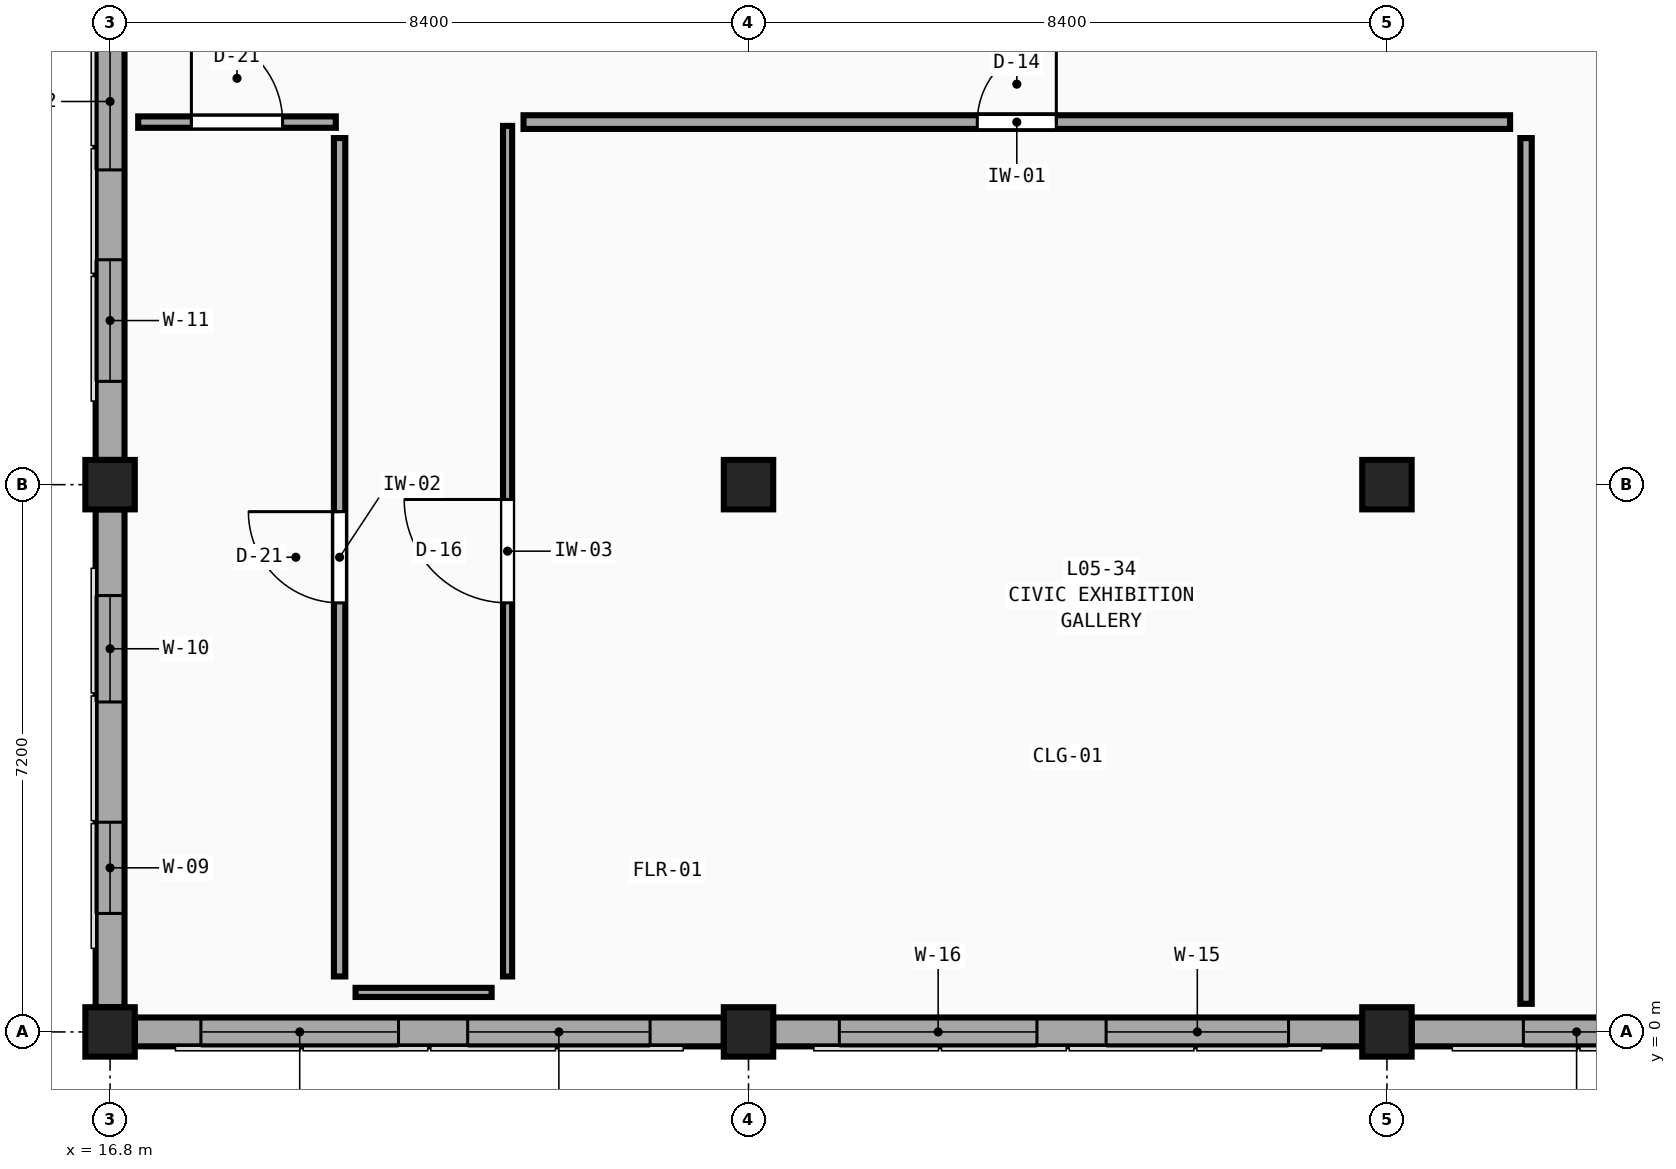
"""IFC4 building model, lengths in metres.
Left out: names, types, materials, properties, quantities, classifications, styles, units other than length and angle.
Written with IfcOpenShell. Run it as: python <this file> out.ifc"""

import sys

from ifc_helpers import new_model, si_unit, direction, frame, frame_2d, origin, origin_2d, place, context, subcontext, project, spatial, rectangle, extrude, element, fill, save


model = new_model("IFC4")
c1 = context("Model", 3, precision=1e-05, world=origin(), true_north=direction((0.0, 1.0)))
c2 = subcontext(c1, "Body", "Model", "MODEL_VIEW")
j1 = project(units=[si_unit("LENGTHUNIT", "METRE"), si_unit("PLANEANGLEUNIT", "RADIAN")], contexts=[c1])
p1 = place(None, origin())
s1 = spatial("IfcSite", under=j1, at=p1, CompositionType="ELEMENT")
p2 = place(p1, origin())
s2 = spatial("IfcBuilding", under=s1, at=p2, CompositionType="ELEMENT")
p3 = place(p2, frame((0.0, 0.0, 23.4)))
s3 = spatial("IfcBuildingStorey", under=s2, at=p3, CompositionType="ELEMENT", Elevation=23.4)
for number, where, z_axis, x_axis in (
    (1, (16.8, 0.0, 0.0), (0.0, 0.0, 1.0), (1.0, 0.0, 0.0)),
    (2, (16.8, 7.2, 0.0), (0.0, 0.0, 1.0), (1.0, 0.0, 0.0)),
    (3, (25.2, 0.0, 0.0), (0.0, 0.0, 1.0), (1.0, 0.0, 0.0)),
    (4, (25.2, 7.2, 0.0), (0.0, 0.0, 1.0), (1.0, 0.0, 0.0)),
    (5, (33.6, 0.0, 0.0), (0.0, 0.0, 1.0), (1.0, 0.0, 0.0)),
    (6, (33.6, 7.2, 0.0), (0.0, 0.0, 1.0), (1.0, 0.0, 0.0)),
):
    element("IfcColumn", number, at=place(p3, frame(where, z_axis=z_axis, x_axis=x_axis)), inside=s3, PredefinedType="COLUMN", context=c2, shape_type="SweptSolid", body=[
        extrude(rectangle(XDim=0.65, YDim=0.65, at=origin_2d()), origin(), (0.0, 0.0, 1.0), 4.5),
    ])
p4 = place(p3, frame((24.875, 0.0, 0.0), z_axis=(0.0, 0.0, 1.0), x_axis=(-1.0, 0.0, 0.0)))
e7 = element("IfcWall", 7, at=p4, inside=s3, PredefinedType="SOLIDWALL", context=c2, shape_type="SweptSolid", body=[
    extrude(rectangle(XDim=7.75, YDim=0.38, at=frame_2d((3.875, 0.0))), origin(), (0.0, 0.0, 1.0), 3.66),
])
p5 = place(p4, frame((0.97, 0.0, 0.75)))
e8 = element("IfcOpeningElement", 8, at=p5, cuts=e7, PredefinedType="OPENING", context=c2, shape_type="SweptSolid", body=[
    extrude(rectangle(XDim=2.4, YDim=1.9, at=frame_2d((1.2, 0.95))), frame((0.0, 0.21, 0.0), z_axis=(0.0, -1.0, 0.0), x_axis=(1.0, 0.0, 0.0)), (0.0, 0.0, 1.0), 0.42),
])
p6 = place(p4, frame((4.28, 0.0, 0.75)))
e9 = element("IfcOpeningElement", 9, at=p6, cuts=e7, PredefinedType="OPENING", context=c2, shape_type="SweptSolid", body=[
    extrude(rectangle(XDim=2.6, YDim=1.9, at=frame_2d((1.3, 0.95))), frame((0.0, 0.21, 0.0), z_axis=(0.0, -1.0, 0.0), x_axis=(1.0, 0.0, 0.0)), (0.0, 0.0, 1.0), 0.42),
])
p7 = place(p3, frame((16.8, 0.325, 0.0), z_axis=(0.0, 0.0, 1.0), x_axis=(0.0, 1.0, 0.0)))
e10 = element("IfcWall", 10, at=p7, inside=s3, PredefinedType="SOLIDWALL", context=c2, shape_type="SweptSolid", body=[
    extrude(rectangle(XDim=6.55, YDim=0.38, at=frame_2d((3.275, 0.0))), origin(), (0.0, 0.0, 1.0), 3.66),
])
p8 = place(p7, frame((1.234, 0.0, 0.75)))
e11 = element("IfcOpeningElement", 11, at=p8, cuts=e10, PredefinedType="OPENING", context=c2, shape_type="SweptSolid", body=[
    extrude(rectangle(XDim=1.2, YDim=2.08, at=frame_2d((0.6, 1.04))), frame((0.0, 0.21, 0.0), z_axis=(0.0, -1.0, 0.0), x_axis=(1.0, 0.0, 0.0)), (0.0, 0.0, 1.0), 0.42),
])
p9 = place(p7, frame((4.016, 0.0, 0.75)))
e12 = element("IfcOpeningElement", 12, at=p9, cuts=e10, PredefinedType="OPENING", context=c2, shape_type="SweptSolid", body=[
    extrude(rectangle(XDim=1.4, YDim=2.08, at=frame_2d((0.7, 1.04))), frame((0.0, 0.21, 0.0), z_axis=(0.0, -1.0, 0.0), x_axis=(1.0, 0.0, 0.0)), (0.0, 0.0, 1.0), 0.42),
])
p10 = place(p3, frame((16.8, 7.525, 0.0), z_axis=(0.0, 0.0, 1.0), x_axis=(0.0, 1.0, 0.0)))
e13 = element("IfcWall", 13, at=p10, inside=s3, PredefinedType="SOLIDWALL", context=c2, shape_type="SweptSolid", body=[
    extrude(rectangle(XDim=6.55, YDim=0.38, at=frame_2d((3.275, 0.0))), origin(), (0.0, 0.0, 1.0), 3.66),
])
p11 = place(p10, frame((1.034, 0.0, 0.75)))
e14 = element("IfcOpeningElement", 14, at=p11, cuts=e13, PredefinedType="OPENING", context=c2, shape_type="SweptSolid", body=[
    extrude(rectangle(XDim=1.6, YDim=2.08, at=frame_2d((0.8, 1.04))), frame((0.0, 0.21, 0.0), z_axis=(0.0, -1.0, 0.0), x_axis=(1.0, 0.0, 0.0)), (0.0, 0.0, 1.0), 0.42),
])
p12 = place(p10, frame((3.816, 0.0, 0.75)))
e15 = element("IfcOpeningElement", 15, at=p12, cuts=e13, PredefinedType="OPENING", context=c2, shape_type="SweptSolid", body=[
    extrude(rectangle(XDim=1.8, YDim=2.08, at=frame_2d((0.9, 1.04))), frame((0.0, 0.21, 0.0), z_axis=(0.0, -1.0, 0.0), x_axis=(1.0, 0.0, 0.0)), (0.0, 0.0, 1.0), 0.42),
])
p13 = place(p3, frame((33.275, 0.0, 0.0), z_axis=(0.0, 0.0, 1.0), x_axis=(-1.0, 0.0, 0.0)))
e16 = element("IfcWall", 16, at=p13, inside=s3, PredefinedType="SOLIDWALL", context=c2, shape_type="SweptSolid", body=[
    extrude(rectangle(XDim=7.75, YDim=0.38, at=frame_2d((3.875, 0.0))), origin(), (0.0, 0.0, 1.0), 3.66),
])
p14 = place(p13, frame((0.97, 0.0, 0.75)))
e17 = element("IfcOpeningElement", 17, at=p14, cuts=e16, PredefinedType="OPENING", context=c2, shape_type="SweptSolid", body=[
    extrude(rectangle(XDim=2.4, YDim=2.08, at=frame_2d((1.2, 1.04))), frame((0.0, 0.21, 0.0), z_axis=(0.0, -1.0, 0.0), x_axis=(1.0, 0.0, 0.0)), (0.0, 0.0, 1.0), 0.42),
])
p15 = place(p13, frame((4.28, 0.0, 0.75)))
e18 = element("IfcOpeningElement", 18, at=p15, cuts=e16, PredefinedType="OPENING", context=c2, shape_type="SweptSolid", body=[
    extrude(rectangle(XDim=2.6, YDim=2.08, at=frame_2d((1.3, 1.04))), frame((0.0, 0.21, 0.0), z_axis=(0.0, -1.0, 0.0), x_axis=(1.0, 0.0, 0.0)), (0.0, 0.0, 1.0), 0.42),
])
p16 = place(p3, frame((41.675, 0.0, 0.0), z_axis=(0.0, 0.0, 1.0), x_axis=(-1.0, 0.0, 0.0)))
e19 = element("IfcWall", 19, at=p16, inside=s3, PredefinedType="SOLIDWALL", context=c2, shape_type="SweptSolid", body=[
    extrude(rectangle(XDim=7.75, YDim=0.38, at=frame_2d((3.875, 0.0))), origin(), (0.0, 0.0, 1.0), 3.66),
])
p17 = place(p16, frame((1.57, 0.0, 0.75)))
e20 = element("IfcOpeningElement", 20, at=p17, cuts=e19, PredefinedType="OPENING", context=c2, shape_type="SweptSolid", body=[
    extrude(rectangle(XDim=1.2, YDim=2.44, at=frame_2d((0.6, 1.22))), frame((0.0, 0.21, 0.0), z_axis=(0.0, -1.0, 0.0), x_axis=(1.0, 0.0, 0.0)), (0.0, 0.0, 1.0), 0.42),
])
p18 = place(p16, frame((4.88, 0.0, 0.75)))
e21 = element("IfcOpeningElement", 21, at=p18, cuts=e19, PredefinedType="OPENING", context=c2, shape_type="SweptSolid", body=[
    extrude(rectangle(XDim=1.4, YDim=2.44, at=frame_2d((0.7, 1.22))), frame((0.0, 0.21, 0.0), z_axis=(0.0, -1.0, 0.0), x_axis=(1.0, 0.0, 0.0)), (0.0, 0.0, 1.0), 0.42),
])
p19 = place(p3, frame((22.24, 11.97, 0.0), z_axis=(0.0, 0.0, 1.0), x_axis=(1.0, 0.0, 0.0)))
e22 = element("IfcWall", 22, at=p19, inside=s3, PredefinedType="PARTITIONING", context=c2, shape_type="SweptSolid", body=[
    extrude(rectangle(XDim=12.98, YDim=0.18, at=frame_2d((6.49, 0.0))), origin(), (0.0, 0.0, 1.0), 4.21),
])
p20 = place(p19, frame((5.97, 0.0, 0.0)))
e23 = element("IfcOpeningElement", 23, at=p20, cuts=e22, PredefinedType="OPENING", context=c2, shape_type="SweptSolid", body=[
    extrude(rectangle(XDim=1.04, YDim=2.21, at=frame_2d((0.52, 1.105))), frame((0.0, 0.11, 0.0), z_axis=(0.0, -1.0, 0.0), x_axis=(1.0, 0.0, 0.0)), (0.0, 0.0, 1.0), 0.22),
])
p21 = place(p3, frame((22.03, 0.73, 0.0), z_axis=(0.0, 0.0, 1.0), x_axis=(0.0, 1.0, 0.0)))
e24 = element("IfcWall", 24, at=p21, inside=s3, PredefinedType="PARTITIONING", context=c2, shape_type="SweptSolid", body=[
    extrude(rectangle(XDim=11.19, YDim=0.12, at=frame_2d((5.595, 0.0))), origin(), (0.0, 0.0, 1.0), 4.21),
])
p22 = place(p21, frame((4.915, 0.0, 0.0)))
e25 = element("IfcOpeningElement", 25, at=p22, cuts=e24, PredefinedType="OPENING", context=c2, shape_type="SweptSolid", body=[
    extrude(rectangle(XDim=1.36, YDim=2.21, at=frame_2d((0.68, 1.105))), frame((0.0, 0.08, 0.0), z_axis=(0.0, -1.0, 0.0), x_axis=(1.0, 0.0, 0.0)), (0.0, 0.0, 1.0), 0.16),
])
p23 = place(p3, frame((19.82, 0.73, 0.0), z_axis=(0.0, 0.0, 1.0), x_axis=(0.0, 1.0, 0.0)))
e26 = element("IfcWall", 26, at=p23, inside=s3, PredefinedType="PARTITIONING", context=c2, shape_type="SweptSolid", body=[
    extrude(rectangle(XDim=11.03, YDim=0.15, at=frame_2d((5.515, 0.0))), origin(), (0.0, 0.0, 1.0), 4.21),
])
p24 = place(p23, frame((4.915, 0.0, 0.0)))
e27 = element("IfcOpeningElement", 27, at=p24, cuts=e26, PredefinedType="OPENING", context=c2, shape_type="SweptSolid", body=[
    extrude(rectangle(XDim=1.2, YDim=2.29, at=frame_2d((0.6, 1.145))), frame((0.0, 0.095, 0.0), z_axis=(0.0, -1.0, 0.0), x_axis=(1.0, 0.0, 0.0)), (0.0, 0.0, 1.0), 0.19),
])
p25 = place(p3, frame((17.17, 11.97, 0.0), z_axis=(0.0, 0.0, 1.0), x_axis=(1.0, 0.0, 0.0)))
e28 = element("IfcWall", 28, at=p25, inside=s3, PredefinedType="PARTITIONING", context=c2, shape_type="SweptSolid", body=[
    extrude(rectangle(XDim=2.6, YDim=0.15, at=frame_2d((1.3, 0.0))), origin(), (0.0, 0.0, 1.0), 4.21),
])
p26 = place(p25, frame((0.7, 0.0, 0.0)))
e29 = element("IfcOpeningElement", 29, at=p26, cuts=e28, PredefinedType="OPENING", context=c2, shape_type="SweptSolid", body=[
    extrude(rectangle(XDim=1.2, YDim=2.29, at=frame_2d((0.6, 1.145))), frame((0.0, 0.095, 0.0), z_axis=(0.0, -1.0, 0.0), x_axis=(1.0, 0.0, 0.0)), (0.0, 0.0, 1.0), 0.19),
])
p27 = place(p3, frame((20.03, 0.52, 0.0), z_axis=(0.0, 0.0, 1.0), x_axis=(1.0, 0.0, 0.0)))
e30 = element("IfcWall", 30, at=p27, inside=s3, PredefinedType="PARTITIONING", context=c2, shape_type="SweptSolid", body=[
    extrude(rectangle(XDim=1.79, YDim=0.12, at=frame_2d((0.895, 0.0))), origin(), (0.0, 0.0, 1.0), 3.66),
])
p28 = place(p3, frame((35.43, 0.37, 0.0), z_axis=(0.0, 0.0, 1.0), x_axis=(0.0, 1.0, 0.0)))
e31 = element("IfcWall", 31, at=p28, inside=s3, PredefinedType="PARTITIONING", context=c2, shape_type="SweptSolid", body=[
    extrude(rectangle(XDim=11.39, YDim=0.15, at=frame_2d((5.695, 0.0))), origin(), (0.0, 0.0, 1.0), 4.21),
])
p29 = place(p5, origin())
e32 = element("IfcWindow", 32, at=p29, inside=s3, PartitioningType="TRIPLE_PANEL_VERTICAL", PredefinedType="WINDOW", context=c2, shape_type="SweptSolid", body=[
    extrude(rectangle(XDim=2.4, YDim=1.9, at=frame_2d((1.2, 0.95))), frame((0.0, 0.03, 0.0), z_axis=(0.0, -1.0, 0.0), x_axis=(1.0, 0.0, 0.0)), (0.0, 0.0, 1.0), 0.06),
])
fill(e8, e32)
p30 = place(p6, origin())
e33 = element("IfcWindow", 33, at=p30, inside=s3, PartitioningType="TRIPLE_PANEL_VERTICAL", PredefinedType="WINDOW", context=c2, shape_type="SweptSolid", body=[
    extrude(rectangle(XDim=2.6, YDim=1.9, at=frame_2d((1.3, 0.95))), frame((0.0, 0.03, 0.0), z_axis=(0.0, -1.0, 0.0), x_axis=(1.0, 0.0, 0.0)), (0.0, 0.0, 1.0), 0.06),
])
fill(e9, e33)
p31 = place(p8, origin())
e34 = element("IfcWindow", 34, at=p31, inside=s3, PartitioningType="SINGLE_PANEL", PredefinedType="WINDOW", context=c2, shape_type="SweptSolid", body=[
    extrude(rectangle(XDim=1.2, YDim=2.08, at=frame_2d((0.6, 1.04))), frame((0.0, 0.03, 0.0), z_axis=(0.0, -1.0, 0.0), x_axis=(1.0, 0.0, 0.0)), (0.0, 0.0, 1.0), 0.06),
])
fill(e11, e34)
p32 = place(p9, origin())
e35 = element("IfcWindow", 35, at=p32, inside=s3, PartitioningType="DOUBLE_PANEL_VERTICAL", PredefinedType="WINDOW", context=c2, shape_type="SweptSolid", body=[
    extrude(rectangle(XDim=1.4, YDim=2.08, at=frame_2d((0.7, 1.04))), frame((0.0, 0.03, 0.0), z_axis=(0.0, -1.0, 0.0), x_axis=(1.0, 0.0, 0.0)), (0.0, 0.0, 1.0), 0.06),
])
fill(e12, e35)
p33 = place(p11, origin())
e36 = element("IfcWindow", 36, at=p33, inside=s3, PartitioningType="DOUBLE_PANEL_VERTICAL", PredefinedType="WINDOW", context=c2, shape_type="SweptSolid", body=[
    extrude(rectangle(XDim=1.6, YDim=2.08, at=frame_2d((0.8, 1.04))), frame((0.0, 0.03, 0.0), z_axis=(0.0, -1.0, 0.0), x_axis=(1.0, 0.0, 0.0)), (0.0, 0.0, 1.0), 0.06),
])
fill(e14, e36)
p34 = place(p12, origin())
e37 = element("IfcWindow", 37, at=p34, inside=s3, PartitioningType="DOUBLE_PANEL_VERTICAL", PredefinedType="WINDOW", context=c2, shape_type="SweptSolid", body=[
    extrude(rectangle(XDim=1.8, YDim=2.08, at=frame_2d((0.9, 1.04))), frame((0.0, 0.03, 0.0), z_axis=(0.0, -1.0, 0.0), x_axis=(1.0, 0.0, 0.0)), (0.0, 0.0, 1.0), 0.06),
])
fill(e15, e37)
p35 = place(p14, origin())
e38 = element("IfcWindow", 38, at=p35, inside=s3, PartitioningType="TRIPLE_PANEL_VERTICAL", PredefinedType="WINDOW", context=c2, shape_type="SweptSolid", body=[
    extrude(rectangle(XDim=2.4, YDim=2.08, at=frame_2d((1.2, 1.04))), frame((0.0, 0.03, 0.0), z_axis=(0.0, -1.0, 0.0), x_axis=(1.0, 0.0, 0.0)), (0.0, 0.0, 1.0), 0.06),
])
fill(e17, e38)
p36 = place(p15, origin())
e39 = element("IfcWindow", 39, at=p36, inside=s3, PartitioningType="TRIPLE_PANEL_VERTICAL", PredefinedType="WINDOW", context=c2, shape_type="SweptSolid", body=[
    extrude(rectangle(XDim=2.6, YDim=2.08, at=frame_2d((1.3, 1.04))), frame((0.0, 0.03, 0.0), z_axis=(0.0, -1.0, 0.0), x_axis=(1.0, 0.0, 0.0)), (0.0, 0.0, 1.0), 0.06),
])
fill(e18, e39)
p37 = place(p18, origin())
e40 = element("IfcWindow", 40, at=p37, inside=s3, PartitioningType="DOUBLE_PANEL_VERTICAL", PredefinedType="WINDOW", context=c2, shape_type="SweptSolid", body=[
    extrude(rectangle(XDim=1.4, YDim=2.44, at=frame_2d((0.7, 1.22))), frame((0.0, 0.03, 0.0), z_axis=(0.0, -1.0, 0.0), x_axis=(1.0, 0.0, 0.0)), (0.0, 0.0, 1.0), 0.06),
])
fill(e21, e40)
p38 = place(p20, origin())
e41 = element("IfcDoor", 41, at=p38, inside=s3, OperationType="SINGLE_SWING_RIGHT", PredefinedType="DOOR", context=c2, shape_type="SweptSolid", body=[
    extrude(rectangle(XDim=1.04, YDim=2.21, at=frame_2d((0.52, 1.105))), frame((0.0, 0.025, 0.0), z_axis=(0.0, -1.0, 0.0), x_axis=(1.0, 0.0, 0.0)), (0.0, 0.0, 1.0), 0.05),
])
fill(e23, e41)
p39 = place(p22, origin())
e42 = element("IfcDoor", 42, at=p39, inside=s3, OperationType="SINGLE_SWING_RIGHT", PredefinedType="DOOR", context=c2, shape_type="SweptSolid", body=[
    extrude(rectangle(XDim=1.36, YDim=2.21, at=frame_2d((0.68, 1.105))), frame((0.0, 0.025, 0.0), z_axis=(0.0, -1.0, 0.0), x_axis=(1.0, 0.0, 0.0)), (0.0, 0.0, 1.0), 0.05),
])
fill(e25, e42)
p40 = place(p24, origin())
e43 = element("IfcDoor", 43, at=p40, inside=s3, OperationType="SINGLE_SWING_RIGHT", PredefinedType="DOOR", context=c2, shape_type="SweptSolid", body=[
    extrude(rectangle(XDim=1.2, YDim=2.29, at=frame_2d((0.6, 1.145))), frame((0.0, 0.025, 0.0), z_axis=(0.0, -1.0, 0.0), x_axis=(1.0, 0.0, 0.0)), (0.0, 0.0, 1.0), 0.05),
])
fill(e27, e43)
p41 = place(p26, origin())
e44 = element("IfcDoor", 44, at=p41, inside=s3, OperationType="SINGLE_SWING_LEFT", PredefinedType="DOOR", context=c2, shape_type="SweptSolid", body=[
    extrude(rectangle(XDim=1.2, YDim=2.29, at=frame_2d((0.6, 1.145))), frame((0.0, 0.025, 0.0), z_axis=(0.0, -1.0, 0.0), x_axis=(1.0, 0.0, 0.0)), (0.0, 0.0, 1.0), 0.05),
])
fill(e29, e44)
save(model, sys.argv[1])
